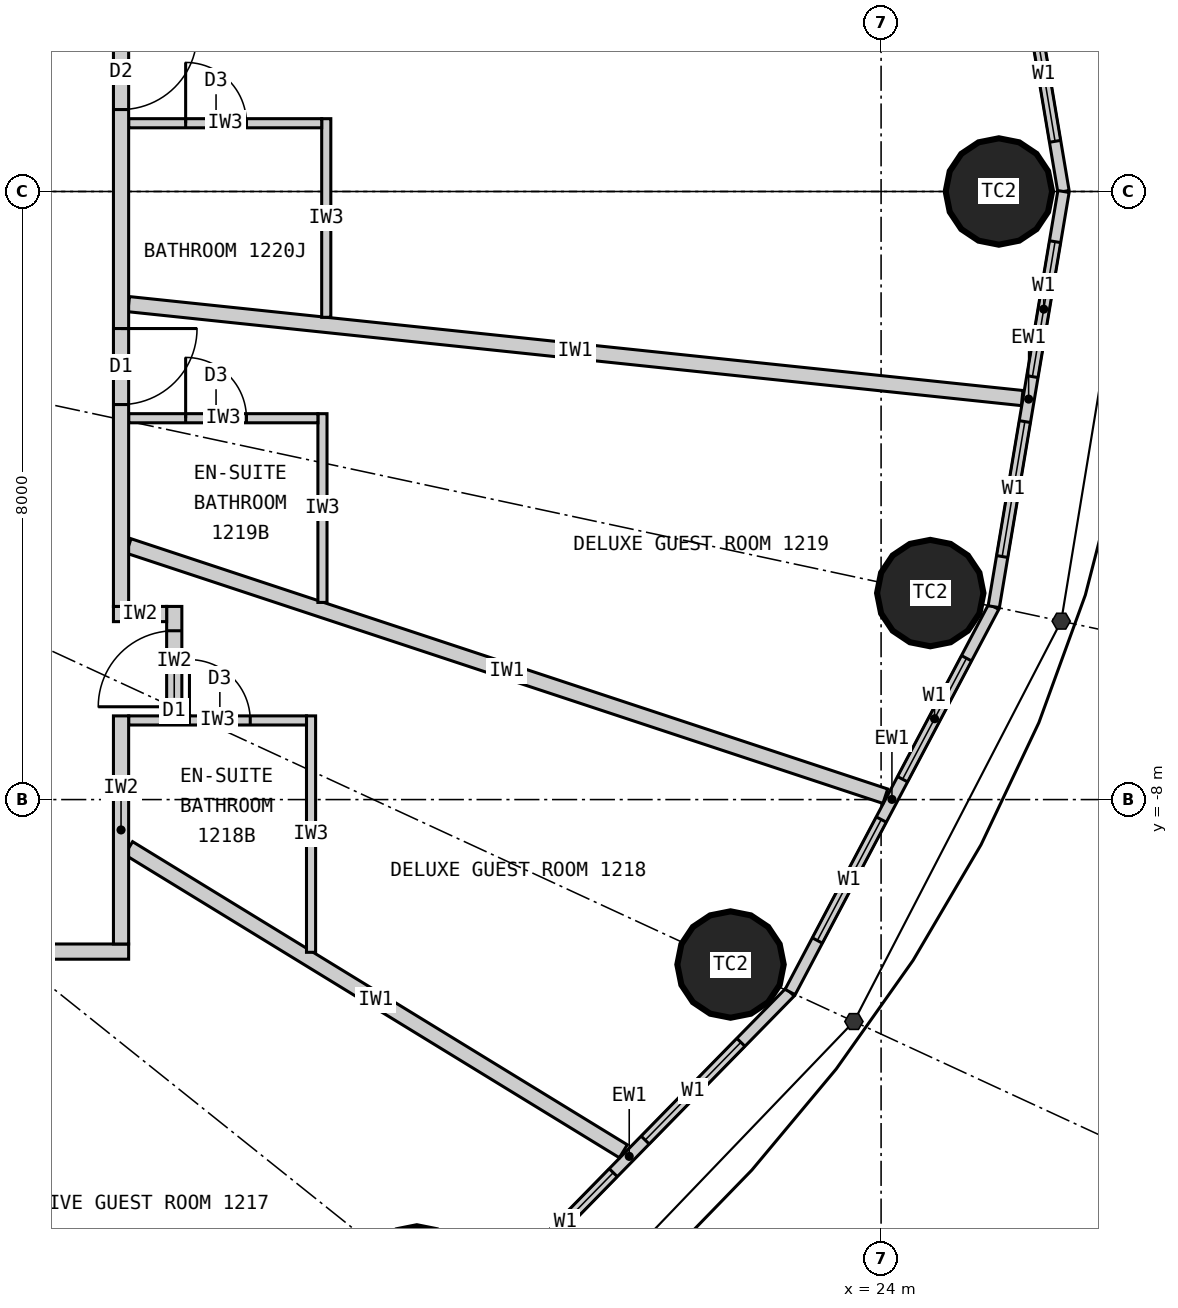
"""IFC4 building model, lengths in metres.
Left out: names, types, materials, properties, quantities, classifications, styles, units other than length and angle.
Written with IfcOpenShell. Run it as: python <this file> out.ifc"""

import sys

from ifc_helpers import new_model, si_unit, direction, frame, frame_2d, origin, origin_2d, place, context, subcontext, project, spatial, rectangle, circle, extrude, element, fill, save


model = new_model("IFC4")
c1 = context("Model", 3, precision=1e-05, world=origin(), true_north=direction((0.0, 1.0)))
c2 = subcontext(c1, "Body", "Model", "MODEL_VIEW")
j1 = project(units=[si_unit("LENGTHUNIT", "METRE"), si_unit("PLANEANGLEUNIT", "RADIAN")], contexts=[c1])
p1 = place(None, origin())
s1 = spatial("IfcSite", under=j1, at=p1, CompositionType="ELEMENT")
p2 = place(p1, origin())
s2 = spatial("IfcBuilding", under=s1, at=p2, CompositionType="ELEMENT")
p3 = place(p2, frame((0.0, 0.0, 54.0)))
s3 = spatial("IfcBuildingStorey", under=s2, at=p3, CompositionType="ELEMENT", Elevation=54.0)
for number, where, z_axis, x_axis in (
    (1, (25.55, 0.0, 0.0), (0.0, 0.0, 1.0), (1.0, 0.0, 0.0)),
    (2, (17.892, -14.313, 0.0), (0.0, 0.0, 1.0), (1.0, 0.0, 0.0)),
    (3, (22.019, -10.17, 0.0), (0.0, 0.0, 1.0), (1.0, 0.0, 0.0)),
    (4, (24.647, -5.283, 0.0), (0.0, 0.0, 1.0), (1.0, 0.0, 0.0)),
):
    element("IfcColumn", number, at=place(p3, frame(where, z_axis=z_axis, x_axis=x_axis)), inside=s3, PredefinedType="COLUMN", context=c2, shape_type="SweptSolid", body=[
        extrude(circle(Radius=0.7, at=origin_2d()), origin(), (0.0, 0.0, 1.0), 3.3),
    ])
p4 = place(p3, frame((26.4, 0.0, 0.0), z_axis=(0.0, 0.0, 1.0), x_axis=(-0.165642551694, 0.986185857264, 0.0)))
e5 = element("IfcWall", 5, at=p4, inside=s3, PredefinedType="ELEMENTEDWALL", context=c2, shape_type="SweptSolid", body=[
    extrude(rectangle(XDim=5.539, YDim=0.15, at=frame_2d((2.77, 0.0))), origin(), (0.0, 0.0, 1.0), 3.12),
])
p5 = place(p4, frame((0.669, 0.0, 0.9)))
e6 = element("IfcOpeningElement", 6, at=p5, cuts=e5, PredefinedType="OPENING", context=c2, shape_type="SweptSolid", body=[
    extrude(rectangle(XDim=1.8, YDim=1.9, at=frame_2d((0.9, 0.95))), frame((0.0, 0.085, 0.0), z_axis=(0.0, -1.0, 0.0), x_axis=(1.0, 0.0, 0.0)), (0.0, 0.0, 1.0), 0.17),
])
p6 = place(p4, frame((3.07, 0.0, 0.9)))
e7 = element("IfcOpeningElement", 7, at=p6, cuts=e5, PredefinedType="OPENING", context=c2, shape_type="SweptSolid", body=[
    extrude(rectangle(XDim=1.8, YDim=1.9, at=frame_2d((0.9, 0.95))), frame((0.0, 0.085, 0.0), z_axis=(0.0, -1.0, 0.0), x_axis=(1.0, 0.0, 0.0)), (0.0, 0.0, 1.0), 0.17),
])
p7 = place(p3, frame((18.57, -14.856, 0.0), z_axis=(0.0, 0.0, 1.0), x_axis=(0.699602905915, 0.714531856557, 0.0)))
e8 = element("IfcWall", 8, at=p7, inside=s3, PredefinedType="ELEMENTEDWALL", context=c2, shape_type="SweptSolid", body=[
    extrude(rectangle(XDim=6.051, YDim=0.15, at=frame_2d((3.025, 0.0))), origin(), (0.0, 0.0, 1.0), 3.12),
])
p8 = place(p7, frame((0.926, 0.0, 0.9)))
e9 = element("IfcOpeningElement", 9, at=p8, cuts=e8, PredefinedType="OPENING", context=c2, shape_type="SweptSolid", body=[
    extrude(rectangle(XDim=1.8, YDim=1.9, at=frame_2d((0.9, 0.95))), frame((0.0, 0.085, 0.0), z_axis=(0.0, -1.0, 0.0), x_axis=(1.0, 0.0, 0.0)), (0.0, 0.0, 1.0), 0.17),
])
p9 = place(p7, frame((3.325, 0.0, 0.9)))
e10 = element("IfcOpeningElement", 10, at=p9, cuts=e8, PredefinedType="OPENING", context=c2, shape_type="SweptSolid", body=[
    extrude(rectangle(XDim=1.8, YDim=1.9, at=frame_2d((0.9, 0.95))), frame((0.0, 0.085, 0.0), z_axis=(0.0, -1.0, 0.0), x_axis=(1.0, 0.0, 0.0)), (0.0, 0.0, 1.0), 0.17),
])
p10 = place(p3, frame((22.803, -10.532, 0.0), z_axis=(0.0, 0.0, 1.0), x_axis=(0.467296867008, 0.884100468321, 0.0)))
e11 = element("IfcWall", 11, at=p10, inside=s3, PredefinedType="ELEMENTEDWALL", context=c2, shape_type="SweptSolid", body=[
    extrude(rectangle(XDim=5.734, YDim=0.15, at=frame_2d((2.867, 0.0))), origin(), (0.0, 0.0, 1.0), 3.12),
])
p11 = place(p10, frame((0.767, 0.0, 0.9)))
e12 = element("IfcOpeningElement", 12, at=p11, cuts=e11, PredefinedType="OPENING", context=c2, shape_type="SweptSolid", body=[
    extrude(rectangle(XDim=1.8, YDim=1.9, at=frame_2d((0.9, 0.95))), frame((0.0, 0.085, 0.0), z_axis=(0.0, -1.0, 0.0), x_axis=(1.0, 0.0, 0.0)), (0.0, 0.0, 1.0), 0.17),
])
p12 = place(p10, frame((3.167, 0.0, 0.9)))
e13 = element("IfcOpeningElement", 13, at=p12, cuts=e11, PredefinedType="OPENING", context=c2, shape_type="SweptSolid", body=[
    extrude(rectangle(XDim=1.8, YDim=1.9, at=frame_2d((0.9, 0.95))), frame((0.0, 0.085, 0.0), z_axis=(0.0, -1.0, 0.0), x_axis=(1.0, 0.0, 0.0)), (0.0, 0.0, 1.0), 0.17),
])
p13 = place(p3, frame((25.482, -5.462, 0.0), z_axis=(0.0, 0.0, 1.0), x_axis=(0.165642551694, 0.986185857264, 0.0)))
e14 = element("IfcWall", 14, at=p13, inside=s3, PredefinedType="ELEMENTEDWALL", context=c2, shape_type="SweptSolid", body=[
    extrude(rectangle(XDim=5.539, YDim=0.15, at=frame_2d((2.77, 0.0))), origin(), (0.0, 0.0, 1.0), 3.12),
])
p14 = place(p13, frame((0.669, 0.0, 0.9)))
e15 = element("IfcOpeningElement", 15, at=p14, cuts=e14, PredefinedType="OPENING", context=c2, shape_type="SweptSolid", body=[
    extrude(rectangle(XDim=1.8, YDim=1.9, at=frame_2d((0.9, 0.95))), frame((0.0, 0.085, 0.0), z_axis=(0.0, -1.0, 0.0), x_axis=(1.0, 0.0, 0.0)), (0.0, 0.0, 1.0), 0.17),
])
p15 = place(p13, frame((3.07, 0.0, 0.9)))
e16 = element("IfcOpeningElement", 16, at=p15, cuts=e14, PredefinedType="OPENING", context=c2, shape_type="SweptSolid", body=[
    extrude(rectangle(XDim=1.8, YDim=1.9, at=frame_2d((0.9, 0.95))), frame((0.0, 0.085, 0.0), z_axis=(0.0, -1.0, 0.0), x_axis=(1.0, 0.0, 0.0)), (0.0, 0.0, 1.0), 0.17),
])
p16 = place(p3, frame((14.1, -8.639, 0.0), z_axis=(0.0, 0.0, 1.0), x_axis=(0.852672493023, -0.522445805459, 0.0)))
e17 = element("IfcWall", 17, at=p16, inside=s3, PredefinedType="PARTITIONING", context=c2, shape_type="SweptSolid", body=[
    extrude(rectangle(XDim=7.633, YDim=0.2, at=frame_2d((3.817, 0.0))), origin(), (0.0, 0.0, 1.0), 3.12),
])
p17 = place(p3, frame((14.1, -4.663, 0.0), z_axis=(0.0, 0.0, 1.0), x_axis=(0.949432655039, -0.31397075269, 0.0)))
e18 = element("IfcWall", 18, at=p17, inside=s3, PredefinedType="PARTITIONING", context=c2, shape_type="SweptSolid", body=[
    extrude(rectangle(XDim=10.486, YDim=0.2, at=frame_2d((5.243, 0.0))), origin(), (0.0, 0.0, 1.0), 3.12),
])
p18 = place(p3, frame((14.1, -1.482, 0.0), z_axis=(0.0, 0.0, 1.0), x_axis=(0.994522076235, -0.104526742422, 0.0)))
e19 = element("IfcWall", 19, at=p18, inside=s3, PredefinedType="PARTITIONING", context=c2, shape_type="SweptSolid", body=[
    extrude(rectangle(XDim=11.821, YDim=0.2, at=frame_2d((5.91, 0.0))), origin(), (0.0, 0.0, 1.0), 2.32),
])
p19 = place(p3, frame((16.5, -10.01, 0.0), z_axis=(0.0, 0.0, 1.0), x_axis=(0.0, 1.0, 0.0)))
e20 = element("IfcWall", 20, at=p19, inside=s3, PredefinedType="PARTITIONING", context=c2, shape_type="SweptSolid", body=[
    extrude(rectangle(XDim=3.111, YDim=0.12, at=frame_2d((1.555, 0.0))), origin(), (0.0, 0.0, 1.0), 3.12),
])
p20 = place(p3, frame((14.1, -6.959, 0.0), z_axis=(0.0, 0.0, 1.0), x_axis=(1.0, 0.0, 0.0)))
e21 = element("IfcWall", 21, at=p20, inside=s3, PredefinedType="PARTITIONING", context=c2, shape_type="SweptSolid", body=[
    extrude(rectangle(XDim=2.34, YDim=0.12, at=frame_2d((1.17, 0.0))), origin(), (0.0, 0.0, 1.0), 3.12),
])
p21 = place(p20, frame((0.8, 0.0, 0.0)))
e22 = element("IfcOpeningElement", 22, at=p21, cuts=e21, PredefinedType="OPENING", context=c2, shape_type="SweptSolid", body=[
    extrude(rectangle(XDim=0.8, YDim=2.1, at=frame_2d((0.4, 1.05))), frame((0.0, 0.07, 0.0), z_axis=(0.0, -1.0, 0.0), x_axis=(1.0, 0.0, 0.0)), (0.0, 0.0, 1.0), 0.14),
])
p22 = place(p3, frame((16.65, -5.406, 0.0), z_axis=(0.0, 0.0, 1.0), x_axis=(0.0, 1.0, 0.0)))
e23 = element("IfcWall", 23, at=p22, inside=s3, PredefinedType="PARTITIONING", context=c2, shape_type="SweptSolid", body=[
    extrude(rectangle(XDim=2.483, YDim=0.12, at=frame_2d((1.242, 0.0))), origin(), (0.0, 0.0, 1.0), 3.12),
])
p23 = place(p3, frame((14.1, -2.983, 0.0), z_axis=(0.0, 0.0, 1.0), x_axis=(1.0, 0.0, 0.0)))
e24 = element("IfcWall", 24, at=p23, inside=s3, PredefinedType="PARTITIONING", context=c2, shape_type="SweptSolid", body=[
    extrude(rectangle(XDim=2.49, YDim=0.12, at=frame_2d((1.245, 0.0))), origin(), (0.0, 0.0, 1.0), 3.12),
])
p24 = place(p23, frame((0.75, 0.0, 0.0)))
e25 = element("IfcOpeningElement", 25, at=p24, cuts=e24, PredefinedType="OPENING", context=c2, shape_type="SweptSolid", body=[
    extrude(rectangle(XDim=0.8, YDim=2.1, at=frame_2d((0.4, 1.05))), frame((0.0, 0.07, 0.0), z_axis=(0.0, -1.0, 0.0), x_axis=(1.0, 0.0, 0.0)), (0.0, 0.0, 1.0), 0.14),
])
p25 = place(p3, frame((16.7, -1.655, 0.0), z_axis=(0.0, 0.0, 1.0), x_axis=(0.0, 1.0, 0.0)))
e26 = element("IfcWall", 26, at=p25, inside=s3, PredefinedType="PARTITIONING", context=c2, shape_type="SweptSolid", body=[
    extrude(rectangle(XDim=2.613, YDim=0.12, at=frame_2d((1.307, 0.0))), origin(), (0.0, 0.0, 1.0), 3.12),
])
p26 = place(p3, frame((14.1, 0.898, 0.0), z_axis=(0.0, 0.0, 1.0), x_axis=(1.0, 0.0, 0.0)))
e27 = element("IfcWall", 27, at=p26, inside=s3, PredefinedType="PARTITIONING", context=c2, shape_type="SweptSolid", body=[
    extrude(rectangle(XDim=2.54, YDim=0.12, at=frame_2d((1.27, 0.0))), origin(), (0.0, 0.0, 1.0), 3.12),
])
p27 = place(p26, frame((0.75, 0.0, 0.0)))
e28 = element("IfcOpeningElement", 28, at=p27, cuts=e27, PredefinedType="OPENING", context=c2, shape_type="SweptSolid", body=[
    extrude(rectangle(XDim=0.8, YDim=2.1, at=frame_2d((0.4, 1.05))), frame((0.0, 0.07, 0.0), z_axis=(0.0, -1.0, 0.0), x_axis=(1.0, 0.0, 0.0)), (0.0, 0.0, 1.0), 0.14),
])
p28 = place(p3, frame((14.7, -6.899, 0.0), z_axis=(0.0, 0.0, 1.0), x_axis=(0.0, 1.0, 0.0)))
e29 = element("IfcWall", 29, at=p28, inside=s3, PredefinedType="PARTITIONING", context=c2, shape_type="SweptSolid", body=[
    extrude(rectangle(XDim=1.44, YDim=0.2, at=frame_2d((0.72, 0.0))), origin(), (0.0, 0.0, 1.0), 3.12),
])
p29 = place(p28, frame((0.12, 0.0, 0.0)))
e30 = element("IfcOpeningElement", 30, at=p29, cuts=e29, PredefinedType="OPENING", context=c2, shape_type="SweptSolid", body=[
    extrude(rectangle(XDim=1.0, YDim=2.2, at=frame_2d((0.5, 1.1))), frame((0.0, 0.11, 0.0), z_axis=(0.0, -1.0, 0.0), x_axis=(1.0, 0.0, 0.0)), (0.0, 0.0, 1.0), 0.22),
])
p30 = place(p3, frame((13.9, -5.559, 0.0), z_axis=(0.0, 0.0, 1.0), x_axis=(1.0, 0.0, 0.0)))
e31 = element("IfcWall", 31, at=p30, inside=s3, PredefinedType="PARTITIONING", context=c2, shape_type="SweptSolid", body=[
    extrude(rectangle(XDim=0.7, YDim=0.2, at=frame_2d((0.35, 0.0))), origin(), (0.0, 0.0, 1.0), 3.12),
])
p31 = place(p3, frame((14.1, -10.0, 0.0), z_axis=(0.0, 0.0, 1.0), x_axis=(-1.0, 0.0, 0.0)))
e32 = element("IfcWall", 32, at=p31, inside=s3, PredefinedType="PARTITIONING", context=c2, shape_type="SweptSolid", body=[
    extrude(rectangle(XDim=2.481, YDim=0.2, at=frame_2d((1.24, 0.0))), origin(), (0.0, 0.0, 1.0), 3.12),
])
p32 = place(p3, frame((14.0, -9.9, 0.0), z_axis=(0.0, 0.0, 1.0), x_axis=(0.0, 1.0, 0.0)))
e33 = element("IfcWall", 33, at=p32, inside=s3, PredefinedType="PARTITIONING", context=c2, shape_type="SweptSolid", body=[
    extrude(rectangle(XDim=3.001, YDim=0.2, at=frame_2d((1.5, 0.0))), origin(), (0.0, 0.0, 1.0), 3.12),
])
p33 = place(p3, frame((14.0, -5.459, 0.0), z_axis=(0.0, 0.0, 1.0), x_axis=(0.0, 1.0, 0.0)))
e34 = element("IfcWall", 34, at=p33, inside=s3, PredefinedType="PARTITIONING", context=c2, shape_type="SweptSolid", body=[
    extrude(rectangle(XDim=15.359, YDim=0.2, at=frame_2d((7.679, 0.0))), origin(), (0.0, 0.0, 1.0), 3.12),
])
p34 = place(p33, frame((2.656, 0.0, 0.0)))
e35 = element("IfcOpeningElement", 35, at=p34, cuts=e34, PredefinedType="OPENING", context=c2, shape_type="SweptSolid", body=[
    extrude(rectangle(XDim=1.0, YDim=2.2, at=frame_2d((0.5, 1.1))), frame((0.0, 0.11, 0.0), z_axis=(0.0, -1.0, 0.0), x_axis=(1.0, 0.0, 0.0)), (0.0, 0.0, 1.0), 0.22),
])
p35 = place(p33, frame((6.537, 0.0, 0.0)))
e36 = element("IfcOpeningElement", 36, at=p35, cuts=e34, PredefinedType="OPENING", context=c2, shape_type="SweptSolid", body=[
    extrude(rectangle(XDim=1.0, YDim=2.2, at=frame_2d((0.5, 1.1))), frame((0.0, 0.11, 0.0), z_axis=(0.0, -1.0, 0.0), x_axis=(1.0, 0.0, 0.0)), (0.0, 0.0, 1.0), 0.22),
])
p36 = place(p33, frame((12.682, 0.0, 0.0)))
e37 = element("IfcOpeningElement", 37, at=p36, cuts=e34, PredefinedType="OPENING", context=c2, shape_type="SweptSolid", body=[
    extrude(rectangle(XDim=1.0, YDim=2.2, at=frame_2d((0.5, 1.1))), frame((0.0, 0.11, 0.0), z_axis=(0.0, -1.0, 0.0), x_axis=(1.0, 0.0, 0.0)), (0.0, 0.0, 1.0), 0.22),
])
p37 = place(p5, origin())
e38 = element("IfcWindow", 38, at=p37, inside=s3, PartitioningType="SINGLE_PANEL", PredefinedType="WINDOW", context=c2, shape_type="SweptSolid", body=[
    extrude(rectangle(XDim=1.8, YDim=1.9, at=frame_2d((0.9, 0.95))), frame((0.0, 0.03, 0.0), z_axis=(0.0, -1.0, 0.0), x_axis=(1.0, 0.0, 0.0)), (0.0, 0.0, 1.0), 0.06),
])
fill(e6, e38)
p38 = place(p8, origin())
e39 = element("IfcWindow", 39, at=p38, inside=s3, PartitioningType="SINGLE_PANEL", PredefinedType="WINDOW", context=c2, shape_type="SweptSolid", body=[
    extrude(rectangle(XDim=1.8, YDim=1.9, at=frame_2d((0.9, 0.95))), frame((0.0, 0.03, 0.0), z_axis=(0.0, -1.0, 0.0), x_axis=(1.0, 0.0, 0.0)), (0.0, 0.0, 1.0), 0.06),
])
fill(e9, e39)
p39 = place(p9, origin())
e40 = element("IfcWindow", 40, at=p39, inside=s3, PartitioningType="SINGLE_PANEL", PredefinedType="WINDOW", context=c2, shape_type="SweptSolid", body=[
    extrude(rectangle(XDim=1.8, YDim=1.9, at=frame_2d((0.9, 0.95))), frame((0.0, 0.03, 0.0), z_axis=(0.0, -1.0, 0.0), x_axis=(1.0, 0.0, 0.0)), (0.0, 0.0, 1.0), 0.06),
])
fill(e10, e40)
p40 = place(p11, origin())
e41 = element("IfcWindow", 41, at=p40, inside=s3, PartitioningType="SINGLE_PANEL", PredefinedType="WINDOW", context=c2, shape_type="SweptSolid", body=[
    extrude(rectangle(XDim=1.8, YDim=1.9, at=frame_2d((0.9, 0.95))), frame((0.0, 0.03, 0.0), z_axis=(0.0, -1.0, 0.0), x_axis=(1.0, 0.0, 0.0)), (0.0, 0.0, 1.0), 0.06),
])
fill(e12, e41)
p41 = place(p12, origin())
e42 = element("IfcWindow", 42, at=p41, inside=s3, PartitioningType="SINGLE_PANEL", PredefinedType="WINDOW", context=c2, shape_type="SweptSolid", body=[
    extrude(rectangle(XDim=1.8, YDim=1.9, at=frame_2d((0.9, 0.95))), frame((0.0, 0.03, 0.0), z_axis=(0.0, -1.0, 0.0), x_axis=(1.0, 0.0, 0.0)), (0.0, 0.0, 1.0), 0.06),
])
fill(e13, e42)
p42 = place(p14, origin())
e43 = element("IfcWindow", 43, at=p42, inside=s3, PartitioningType="SINGLE_PANEL", PredefinedType="WINDOW", context=c2, shape_type="SweptSolid", body=[
    extrude(rectangle(XDim=1.8, YDim=1.9, at=frame_2d((0.9, 0.95))), frame((0.0, 0.03, 0.0), z_axis=(0.0, -1.0, 0.0), x_axis=(1.0, 0.0, 0.0)), (0.0, 0.0, 1.0), 0.06),
])
fill(e15, e43)
p43 = place(p15, origin())
e44 = element("IfcWindow", 44, at=p43, inside=s3, PartitioningType="SINGLE_PANEL", PredefinedType="WINDOW", context=c2, shape_type="SweptSolid", body=[
    extrude(rectangle(XDim=1.8, YDim=1.9, at=frame_2d((0.9, 0.95))), frame((0.0, 0.03, 0.0), z_axis=(0.0, -1.0, 0.0), x_axis=(1.0, 0.0, 0.0)), (0.0, 0.0, 1.0), 0.06),
])
fill(e16, e44)
p44 = place(p21, origin())
e45 = element("IfcDoor", 45, at=p44, inside=s3, OperationType="SINGLE_SWING_LEFT", PredefinedType="DOOR", context=c2, shape_type="SweptSolid", body=[
    extrude(rectangle(XDim=0.8, YDim=2.1, at=frame_2d((0.4, 1.05))), frame((0.0, 0.025, 0.0), z_axis=(0.0, -1.0, 0.0), x_axis=(1.0, 0.0, 0.0)), (0.0, 0.0, 1.0), 0.05),
])
fill(e22, e45)
p45 = place(p29, origin())
e46 = element("IfcDoor", 46, at=p45, inside=s3, OperationType="SINGLE_SWING_LEFT", PredefinedType="DOOR", context=c2, shape_type="SweptSolid", body=[
    extrude(rectangle(XDim=1.0, YDim=2.2, at=frame_2d((0.5, 1.1))), frame((0.0, 0.025, 0.0), z_axis=(0.0, -1.0, 0.0), x_axis=(1.0, 0.0, 0.0)), (0.0, 0.0, 1.0), 0.05),
])
fill(e30, e46)
p46 = place(p24, origin())
e47 = element("IfcDoor", 47, at=p46, inside=s3, OperationType="SINGLE_SWING_LEFT", PredefinedType="DOOR", context=c2, shape_type="SweptSolid", body=[
    extrude(rectangle(XDim=0.8, YDim=2.1, at=frame_2d((0.4, 1.05))), frame((0.0, 0.025, 0.0), z_axis=(0.0, -1.0, 0.0), x_axis=(1.0, 0.0, 0.0)), (0.0, 0.0, 1.0), 0.05),
])
fill(e25, e47)
p47 = place(p34, origin())
e48 = element("IfcDoor", 48, at=p47, inside=s3, OperationType="SINGLE_SWING_RIGHT", PredefinedType="DOOR", context=c2, shape_type="SweptSolid", body=[
    extrude(rectangle(XDim=1.0, YDim=2.2, at=frame_2d((0.5, 1.1))), frame((0.0, 0.025, 0.0), z_axis=(0.0, -1.0, 0.0), x_axis=(1.0, 0.0, 0.0)), (0.0, 0.0, 1.0), 0.05),
])
fill(e35, e48)
p48 = place(p27, origin())
e49 = element("IfcDoor", 49, at=p48, inside=s3, OperationType="SINGLE_SWING_LEFT", PredefinedType="DOOR", context=c2, shape_type="SweptSolid", body=[
    extrude(rectangle(XDim=0.8, YDim=2.1, at=frame_2d((0.4, 1.05))), frame((0.0, 0.025, 0.0), z_axis=(0.0, -1.0, 0.0), x_axis=(1.0, 0.0, 0.0)), (0.0, 0.0, 1.0), 0.05),
])
fill(e28, e49)
p49 = place(p35, origin())
e50 = element("IfcDoor", 50, at=p49, inside=s3, OperationType="SINGLE_SWING_RIGHT", PredefinedType="DOOR", context=c2, shape_type="SweptSolid", body=[
    extrude(rectangle(XDim=1.0, YDim=2.2, at=frame_2d((0.5, 1.1))), frame((0.0, 0.025, 0.0), z_axis=(0.0, -1.0, 0.0), x_axis=(1.0, 0.0, 0.0)), (0.0, 0.0, 1.0), 0.05),
])
fill(e36, e50)
save(model, sys.argv[1])
